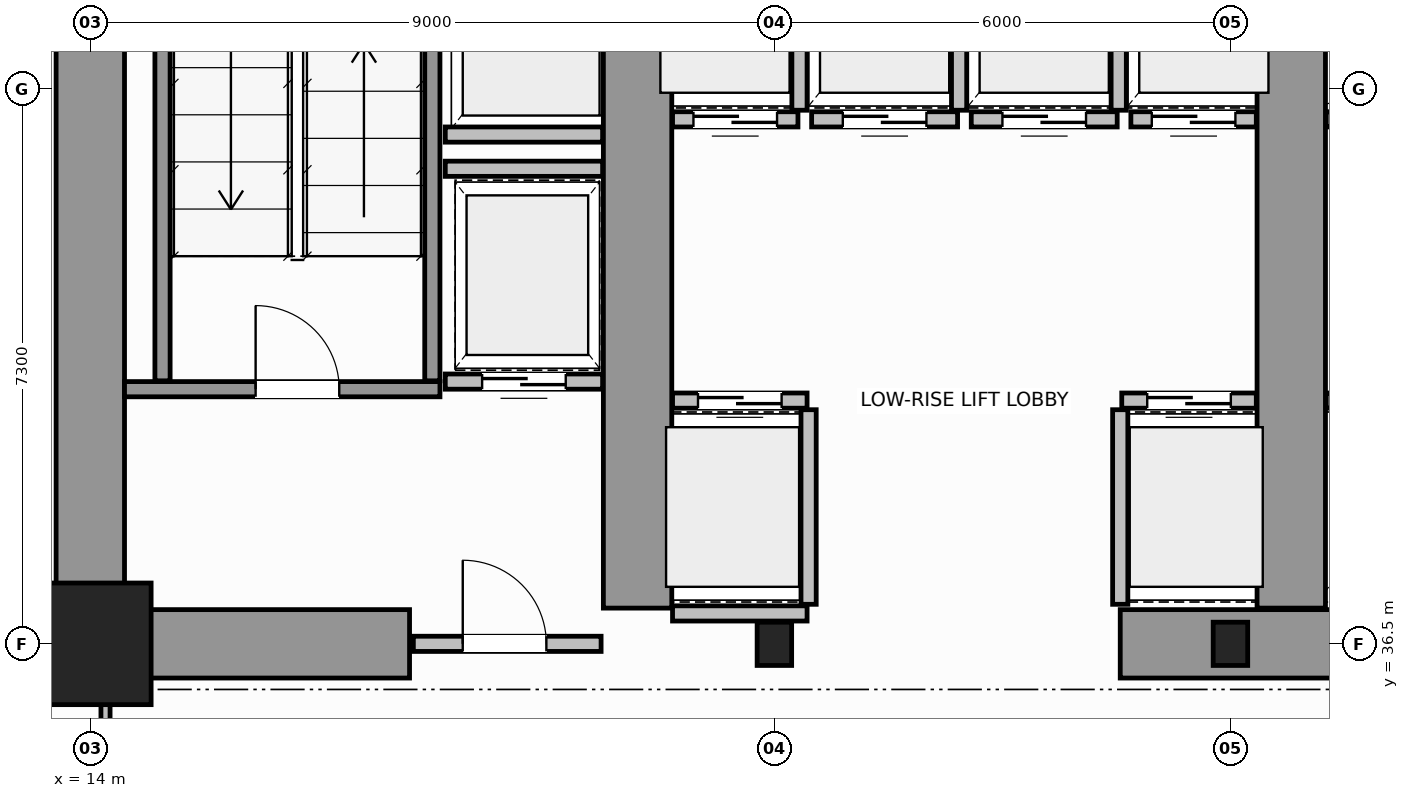
"""IFC4 building model, lengths in metres.
Left out: names, types, materials, properties, quantities, classifications, styles, units other than length and angle.
Written with IfcOpenShell. Run it as: python <this file> out.ifc"""

import sys

from ifc_helpers import new_model, si_unit, direction, frame, frame_2d, origin, origin_2d, place, context, subcontext, project, spatial, rectangle, i_section, extrude, source, transform, mapped, element, fill, save


model = new_model("IFC4")
c1 = context("Model", 3, precision=1e-05, world=origin(), true_north=direction((0.0, 1.0)))
c2 = subcontext(c1, "Body", "Model", "MODEL_VIEW")
j1 = project(units=[si_unit("LENGTHUNIT", "METRE"), si_unit("PLANEANGLEUNIT", "RADIAN")], contexts=[c1])
p1 = place(None, origin())
s1 = spatial("IfcSite", under=j1, at=p1, CompositionType="ELEMENT")
p2 = place(p1, origin())
s2 = spatial("IfcBuilding", under=s1, at=p2, CompositionType="ELEMENT")
p3 = place(p2, frame((0.0, 0.0, 37.8)))
s3 = spatial("IfcBuildingStorey", under=s2, at=p3, CompositionType="ELEMENT", Elevation=37.8)
m1 = source(origin(), c2, "Body", "SweptSolid", [
    extrude(rectangle(XDim=1.6, YDim=1.6, at=origin_2d()), origin(), (0.0, 0.0, 1.0), 3.8),
])
p4 = place(p3, frame((14.0, 36.5, 0.0), z_axis=(0.0, 0.0, 1.0), x_axis=(1.0, 0.0, 0.0)))
e1 = element("IfcColumn", 1, at=p4, inside=s3, PredefinedType="COLUMN", context=c2, shape_type="MappedRepresentation", body=[
    mapped(m1, transform((0.0, 0.0, 0.0), scale=1.0)),
])
m2 = source(origin(), c2, "Body", "SweptSolid", [
    extrude(i_section(OverallWidth=0.454, OverallDepth=0.569, WebThickness=0.078, FlangeThickness=0.08, FilletRadius=0.015, at=origin_2d()), origin(), (0.0, 0.0, 1.0), 3.8),
])
for number, where, z_axis, x_axis in (
    (2, (23.0, 36.5, 0.0), (0.0, 0.0, 1.0), (1.0, 0.0, 0.0)),
    (3, (29.0, 36.5, 0.0), (0.0, 0.0, 1.0), (1.0, 0.0, 0.0)),
):
    element("IfcColumn", number, at=place(p3, frame(where, z_axis=z_axis, x_axis=x_axis)), inside=s3, PredefinedType="COLUMN", context=c2, shape_type="MappedRepresentation", body=[
        mapped(m2, transform((0.0, 0.0, 0.0), scale=1.0)),
    ])
p5 = place(p3, frame((14.0, 36.5, 0.0), z_axis=(0.0, 0.0, 1.0), x_axis=(0.0, 1.0, 0.0)))
e4 = element("IfcWall", 4, at=p5, inside=s3, PredefinedType="SHEAR", context=c2, shape_type="SweptSolid", body=[
    extrude(rectangle(XDim=14.5, YDim=0.9, at=frame_2d((7.25, 0.0))), origin(), (0.0, 0.0, 1.0), 3.8),
])
p6 = place(p3, frame((14.47, 36.5, 0.0), z_axis=(0.0, 0.0, 1.0), x_axis=(1.0, 0.0, 0.0)))
e5 = element("IfcWall", 5, at=p6, inside=s3, PredefinedType="SHEAR", context=c2, shape_type="SweptSolid", body=[
    extrude(rectangle(XDim=3.73, YDim=0.9, at=frame_2d((1.865, 0.0))), origin(), (0.0, 0.0, 1.0), 2.38),
])
p7 = place(p3, frame((27.55, 36.5, 0.0), z_axis=(0.0, 0.0, 1.0), x_axis=(1.0, 0.0, 0.0)))
e6 = element("IfcWall", 6, at=p7, inside=s3, PredefinedType="SHEAR", context=c2, shape_type="SweptSolid", body=[
    extrude(rectangle(XDim=4.5, YDim=0.9, at=frame_2d((2.25, 0.0))), origin(), (0.0, 0.0, 1.0), 3.8),
])
for number, where, z_axis, x_axis in (
    (7, (21.2, 36.97, 0.0), (0.0, 0.0, 1.0), (0.0, 1.0, 0.0)),
    (8, (29.8, 36.97, 0.0), (0.0, 0.0, 1.0), (0.0, 1.0, 0.0)),
):
    element("IfcWall", number, at=place(p3, frame(where, z_axis=z_axis, x_axis=x_axis)), inside=s3, PredefinedType="SHEAR", context=c2, shape_type="SweptSolid", body=[
        extrude(rectangle(XDim=9.23, YDim=0.9, at=frame_2d((4.615, 0.0))), origin(), (0.0, 0.0, 1.0), 3.8),
    ])
p8 = place(p3, frame((14.45, 39.85, 0.0), z_axis=(0.0, 0.0, 1.0), x_axis=(1.0, 0.0, 0.0)))
e9 = element("IfcWall", 9, at=p8, inside=s3, PredefinedType="SOLIDWALL", context=c2, shape_type="SweptSolid", body=[
    extrude(rectangle(XDim=4.15, YDim=0.2, at=frame_2d((2.075, 0.0))), origin(), (0.0, 0.0, 1.0), 3.8),
])
p9 = place(p8, frame((1.725, 0.0, 0.0)))
e10 = element("IfcOpeningElement", 10, at=p9, cuts=e9, PredefinedType="OPENING", context=c2, shape_type="SweptSolid", body=[
    extrude(rectangle(XDim=1.1, YDim=2.15, at=frame_2d((0.55, 1.075))), frame((0.0, 0.11, 0.0), z_axis=(0.0, -1.0, 0.0), x_axis=(1.0, 0.0, 0.0)), (0.0, 0.0, 1.0), 0.22),
])
for number, where, z_axis, x_axis in (
    (11, (14.95, 39.96, 0.0), (0.0, 0.0, 1.0), (0.0, 1.0, 0.0)),
    (12, (18.5, 39.96, 0.0), (0.0, 0.0, 1.0), (0.0, 1.0, 0.0)),
):
    element("IfcWall", number, at=place(p3, frame(where, z_axis=z_axis, x_axis=x_axis)), inside=s3, PredefinedType="SOLIDWALL", context=c2, shape_type="SweptSolid", body=[
        extrude(rectangle(XDim=9.93, YDim=0.2, at=frame_2d((4.965, 0.0))), origin(), (0.0, 0.0, 1.0), 3.8),
    ])
p10 = place(p3, frame((18.25, 36.5, 0.0), z_axis=(0.0, 0.0, 1.0), x_axis=(1.0, 0.0, 0.0)))
e13 = element("IfcWall", 13, at=p10, inside=s3, PredefinedType="SOLIDWALL", context=c2, shape_type="SweptSolid", body=[
    extrude(rectangle(XDim=2.47, YDim=0.2, at=frame_2d((1.235, 0.0))), origin(), (0.0, 0.0, 1.0), 2.37),
])
p11 = place(p10, frame((0.65, 0.0, 0.0)))
e14 = element("IfcOpeningElement", 14, at=p11, cuts=e13, PredefinedType="OPENING", context=c2, shape_type="SweptSolid", body=[
    extrude(rectangle(XDim=1.1, YDim=2.15, at=frame_2d((0.55, 1.075))), frame((0.0, 0.11, 0.0), z_axis=(0.0, -1.0, 0.0), x_axis=(1.0, 0.0, 0.0)), (0.0, 0.0, 1.0), 0.22),
])
p12 = place(p3, frame((21.66, 39.7, 0.0), z_axis=(0.0, 0.0, 1.0), x_axis=(1.0, 0.0, 0.0)))
e15 = element("IfcWall", 15, at=p12, inside=s3, PredefinedType="SOLIDWALL", context=c2, shape_type="SweptSolid", body=[
    extrude(rectangle(XDim=1.77, YDim=0.2, at=frame_2d((0.885, 0.0))), origin(), (0.0, 0.0, 1.0), 3.58),
])
p13 = place(p12, frame((0.335, 0.0, 0.0)))
e16 = element("IfcOpeningElement", 16, at=p13, cuts=e15, PredefinedType="OPENING", context=c2, shape_type="SweptSolid", body=[
    extrude(rectangle(XDim=1.1, YDim=2.15, at=frame_2d((0.55, 1.075))), frame((0.0, 0.11, 0.0), z_axis=(0.0, -1.0, 0.0), x_axis=(1.0, 0.0, 0.0)), (0.0, 0.0, 1.0), 0.22),
])
p14 = place(p3, frame((21.66, 36.9, 0.0), z_axis=(0.0, 0.0, 1.0), x_axis=(1.0, 0.0, 0.0)))
e17 = element("IfcWall", 17, at=p14, inside=s3, PredefinedType="SOLIDWALL", context=c2, shape_type="SweptSolid", body=[
    extrude(rectangle(XDim=1.77, YDim=0.2, at=frame_2d((0.885, 0.0))), origin(), (0.0, 0.0, 1.0), 2.37),
])
p15 = place(p3, frame((23.45, 37.02, 0.0), z_axis=(0.0, 0.0, 1.0), x_axis=(0.0, 1.0, 0.0)))
e18 = element("IfcWall", 18, at=p15, inside=s3, PredefinedType="SOLIDWALL", context=c2, shape_type="SweptSolid", body=[
    extrude(rectangle(XDim=2.56, YDim=0.2, at=frame_2d((1.28, 0.0))), origin(), (0.0, 0.0, 1.0), 3.58),
])
p16 = place(p3, frame((27.57, 39.7, 0.0), z_axis=(0.0, 0.0, 1.0), x_axis=(1.0, 0.0, 0.0)))
e19 = element("IfcWall", 19, at=p16, inside=s3, PredefinedType="SOLIDWALL", context=c2, shape_type="SweptSolid", body=[
    extrude(rectangle(XDim=1.77, YDim=0.2, at=frame_2d((0.885, 0.0))), origin(), (0.0, 0.0, 1.0), 3.58),
])
p17 = place(p16, frame((0.335, 0.0, 0.0)))
e20 = element("IfcOpeningElement", 20, at=p17, cuts=e19, PredefinedType="OPENING", context=c2, shape_type="SweptSolid", body=[
    extrude(rectangle(XDim=1.1, YDim=2.15, at=frame_2d((0.55, 1.075))), frame((0.0, 0.11, 0.0), z_axis=(0.0, -1.0, 0.0), x_axis=(1.0, 0.0, 0.0)), (0.0, 0.0, 1.0), 0.22),
])
p18 = place(p3, frame((27.55, 37.02, 0.0), z_axis=(0.0, 0.0, 1.0), x_axis=(0.0, 1.0, 0.0)))
e21 = element("IfcWall", 21, at=p18, inside=s3, PredefinedType="SOLIDWALL", context=c2, shape_type="SweptSolid", body=[
    extrude(rectangle(XDim=2.56, YDim=0.2, at=frame_2d((1.28, 0.0))), origin(), (0.0, 0.0, 1.0), 3.58),
])
p19 = place(p3, frame((21.66, 43.4, 0.0), z_axis=(0.0, 0.0, 1.0), x_axis=(1.0, 0.0, 0.0)))
e22 = element("IfcWall", 22, at=p19, inside=s3, PredefinedType="SOLIDWALL", context=c2, shape_type="SweptSolid", body=[
    extrude(rectangle(XDim=1.65, YDim=0.2, at=frame_2d((0.825, 0.0))), origin(), (0.0, 0.0, 1.0), 3.58),
])
p20 = place(p19, frame((0.275, 0.0, 0.0)))
e23 = element("IfcOpeningElement", 23, at=p20, cuts=e22, PredefinedType="OPENING", context=c2, shape_type="SweptSolid", body=[
    extrude(rectangle(XDim=1.1, YDim=2.15, at=frame_2d((0.55, 1.075))), frame((0.0, 0.11, 0.0), z_axis=(0.0, -1.0, 0.0), x_axis=(1.0, 0.0, 0.0)), (0.0, 0.0, 1.0), 0.22),
])
p21 = place(p3, frame((23.33, 43.52, 0.0), z_axis=(0.0, 0.0, 1.0), x_axis=(0.0, 1.0, 0.0)))
e24 = element("IfcWall", 24, at=p21, inside=s3, PredefinedType="SOLIDWALL", context=c2, shape_type="SweptSolid", body=[
    extrude(rectangle(XDim=2.56, YDim=0.2, at=frame_2d((1.28, 0.0))), origin(), (0.0, 0.0, 1.0), 3.58),
])
p22 = place(p3, frame((23.49, 43.4, 0.0), z_axis=(0.0, 0.0, 1.0), x_axis=(1.0, 0.0, 0.0)))
e25 = element("IfcWall", 25, at=p22, inside=s3, PredefinedType="SOLIDWALL", context=c2, shape_type="SweptSolid", body=[
    extrude(rectangle(XDim=1.92, YDim=0.2, at=frame_2d((0.96, 0.0))), origin(), (0.0, 0.0, 1.0), 3.58),
])
p23 = place(p22, frame((0.41, 0.0, 0.0)))
e26 = element("IfcOpeningElement", 26, at=p23, cuts=e25, PredefinedType="OPENING", context=c2, shape_type="SweptSolid", body=[
    extrude(rectangle(XDim=1.1, YDim=2.15, at=frame_2d((0.55, 1.075))), frame((0.0, 0.11, 0.0), z_axis=(0.0, -1.0, 0.0), x_axis=(1.0, 0.0, 0.0)), (0.0, 0.0, 1.0), 0.22),
])
p24 = place(p3, frame((25.43, 43.52, 0.0), z_axis=(0.0, 0.0, 1.0), x_axis=(0.0, 1.0, 0.0)))
e27 = element("IfcWall", 27, at=p24, inside=s3, PredefinedType="SOLIDWALL", context=c2, shape_type="SweptSolid", body=[
    extrude(rectangle(XDim=2.56, YDim=0.2, at=frame_2d((1.28, 0.0))), origin(), (0.0, 0.0, 1.0), 3.58),
])
p25 = place(p3, frame((25.59, 43.4, 0.0), z_axis=(0.0, 0.0, 1.0), x_axis=(1.0, 0.0, 0.0)))
e28 = element("IfcWall", 28, at=p25, inside=s3, PredefinedType="SOLIDWALL", context=c2, shape_type="SweptSolid", body=[
    extrude(rectangle(XDim=1.92, YDim=0.2, at=frame_2d((0.96, 0.0))), origin(), (0.0, 0.0, 1.0), 3.58),
])
p26 = place(p25, frame((0.41, 0.0, 0.0)))
e29 = element("IfcOpeningElement", 29, at=p26, cuts=e28, PredefinedType="OPENING", context=c2, shape_type="SweptSolid", body=[
    extrude(rectangle(XDim=1.1, YDim=2.15, at=frame_2d((0.55, 1.075))), frame((0.0, 0.11, 0.0), z_axis=(0.0, -1.0, 0.0), x_axis=(1.0, 0.0, 0.0)), (0.0, 0.0, 1.0), 0.22),
])
p27 = place(p3, frame((27.53, 43.52, 0.0), z_axis=(0.0, 0.0, 1.0), x_axis=(0.0, 1.0, 0.0)))
e30 = element("IfcWall", 30, at=p27, inside=s3, PredefinedType="SOLIDWALL", context=c2, shape_type="SweptSolid", body=[
    extrude(rectangle(XDim=2.56, YDim=0.2, at=frame_2d((1.28, 0.0))), origin(), (0.0, 0.0, 1.0), 3.58),
])
p28 = place(p3, frame((27.69, 43.4, 0.0), z_axis=(0.0, 0.0, 1.0), x_axis=(1.0, 0.0, 0.0)))
e31 = element("IfcWall", 31, at=p28, inside=s3, PredefinedType="SOLIDWALL", context=c2, shape_type="SweptSolid", body=[
    extrude(rectangle(XDim=1.65, YDim=0.2, at=frame_2d((0.825, 0.0))), origin(), (0.0, 0.0, 1.0), 3.58),
])
p29 = place(p28, frame((0.275, 0.0, 0.0)))
e32 = element("IfcOpeningElement", 32, at=p29, cuts=e31, PredefinedType="OPENING", context=c2, shape_type="SweptSolid", body=[
    extrude(rectangle(XDim=1.1, YDim=2.15, at=frame_2d((0.55, 1.075))), frame((0.0, 0.11, 0.0), z_axis=(0.0, -1.0, 0.0), x_axis=(1.0, 0.0, 0.0)), (0.0, 0.0, 1.0), 0.22),
])
p30 = place(p3, frame((30.26, 39.7, 0.0), z_axis=(0.0, 0.0, 1.0), x_axis=(1.0, 0.0, 0.0)))
e33 = element("IfcWall", 33, at=p30, inside=s3, PredefinedType="SOLIDWALL", context=c2, shape_type="SweptSolid", body=[
    extrude(rectangle(XDim=1.77, YDim=0.2, at=frame_2d((0.885, 0.0))), origin(), (0.0, 0.0, 1.0), 3.58),
])
p31 = place(p3, frame((30.26, 43.4, 0.0), z_axis=(0.0, 0.0, 1.0), x_axis=(1.0, 0.0, 0.0)))
e34 = element("IfcWall", 34, at=p31, inside=s3, PredefinedType="SOLIDWALL", context=c2, shape_type="SweptSolid", body=[
    extrude(rectangle(XDim=1.65, YDim=0.2, at=frame_2d((0.825, 0.0))), origin(), (0.0, 0.0, 1.0), 3.58),
])
p32 = place(p3, frame((18.67, 43.2, 0.0), z_axis=(0.0, 0.0, 1.0), x_axis=(1.0, 0.0, 0.0)))
e35 = element("IfcWall", 35, at=p32, inside=s3, PredefinedType="SOLIDWALL", context=c2, shape_type="SweptSolid", body=[
    extrude(rectangle(XDim=2.07, YDim=0.2, at=frame_2d((1.035, 0.0))), origin(), (0.0, 0.0, 1.0), 3.58),
])
p33 = place(p3, frame((18.67, 39.95, 0.0), z_axis=(0.0, 0.0, 1.0), x_axis=(1.0, 0.0, 0.0)))
e36 = element("IfcWall", 36, at=p33, inside=s3, PredefinedType="SOLIDWALL", context=c2, shape_type="SweptSolid", body=[
    extrude(rectangle(XDim=2.07, YDim=0.2, at=frame_2d((1.035, 0.0))), origin(), (0.0, 0.0, 1.0), 3.58),
])
p34 = place(p33, frame((0.485, 0.0, 0.0)))
e37 = element("IfcOpeningElement", 37, at=p34, cuts=e36, PredefinedType="OPENING", context=c2, shape_type="SweptSolid", body=[
    extrude(rectangle(XDim=1.1, YDim=2.15, at=frame_2d((0.55, 1.075))), frame((0.0, 0.11, 0.0), z_axis=(0.0, -1.0, 0.0), x_axis=(1.0, 0.0, 0.0)), (0.0, 0.0, 1.0), 0.22),
])
p35 = place(p3, frame((18.67, 42.75, 0.0), z_axis=(0.0, 0.0, 1.0), x_axis=(1.0, 0.0, 0.0)))
e38 = element("IfcWall", 38, at=p35, inside=s3, PredefinedType="SOLIDWALL", context=c2, shape_type="SweptSolid", body=[
    extrude(rectangle(XDim=2.07, YDim=0.2, at=frame_2d((1.035, 0.0))), origin(), (0.0, 0.0, 1.0), 3.58),
])
p36 = place(p3, frame((14.2, 34.0, 0.0), z_axis=(0.0, 0.0, 1.0), x_axis=(0.0, 1.0, 0.0)))
e39 = element("IfcWall", 39, at=p36, inside=s3, PredefinedType="PARTITIONING", context=c2, shape_type="SweptSolid", body=[
    extrude(rectangle(XDim=2.44, YDim=0.12, at=frame_2d((1.22, 0.0))), origin(), (0.0, 0.0, 1.0), 3.58),
])
p37 = place(p36, frame((0.35, 0.0, 0.0)))
e40 = element("IfcOpeningElement", 40, at=p37, cuts=e39, PredefinedType="OPENING", context=c2, shape_type="SweptSolid", body=[
    extrude(rectangle(XDim=0.9, YDim=2.15, at=frame_2d((0.45, 1.075))), frame((0.0, 0.07, 0.0), z_axis=(0.0, -1.0, 0.0), x_axis=(1.0, 0.0, 0.0)), (0.0, 0.0, 1.0), 0.14),
])
m3 = source(origin(), c2, "Body", "SweptSolid", [
    extrude(rectangle(XDim=1.1, YDim=2.15, at=frame_2d((0.55, 1.075))), frame((0.0, 0.025, 0.0), z_axis=(0.0, -1.0, 0.0), x_axis=(1.0, 0.0, 0.0)), (0.0, 0.0, 1.0), 0.05),
])
p38 = place(p9, origin())
e41 = element("IfcDoor", 41, at=p38, inside=s3, OperationType="SINGLE_SWING_LEFT", PredefinedType="DOOR", context=c2, shape_type="MappedRepresentation", body=[
    mapped(m3, transform((0.0, 0.0, 0.0), scale=1.0)),
])
fill(e10, e41)
p39 = place(p11, origin())
e42 = element("IfcDoor", 42, at=p39, inside=s3, OperationType="SINGLE_SWING_RIGHT", PredefinedType="DOOR", context=c2, shape_type="MappedRepresentation", body=[
    mapped(m3, transform((0.0, 0.0, 0.0), scale=1.0)),
])
fill(e14, e42)
p40 = place(p13, origin())
e43 = element("IfcDoor", 43, at=p40, inside=s3, OperationType="DOUBLE_DOOR_SLIDING", PredefinedType="DOOR", context=c2, shape_type="MappedRepresentation", body=[
    mapped(m3, transform((0.0, 0.0, 0.0), scale=1.0)),
])
fill(e16, e43)
p41 = place(p17, origin())
e44 = element("IfcDoor", 44, at=p41, inside=s3, OperationType="DOUBLE_DOOR_SLIDING", PredefinedType="DOOR", context=c2, shape_type="MappedRepresentation", body=[
    mapped(m3, transform((0.0, 0.0, 0.0), scale=1.0)),
])
fill(e20, e44)
p42 = place(p20, origin())
e45 = element("IfcDoor", 45, at=p42, inside=s3, OperationType="DOUBLE_DOOR_SLIDING", PredefinedType="DOOR", context=c2, shape_type="MappedRepresentation", body=[
    mapped(m3, transform((0.0, 0.0, 0.0), scale=1.0)),
])
fill(e23, e45)
p43 = place(p23, origin())
e46 = element("IfcDoor", 46, at=p43, inside=s3, OperationType="DOUBLE_DOOR_SLIDING", PredefinedType="DOOR", context=c2, shape_type="MappedRepresentation", body=[
    mapped(m3, transform((0.0, 0.0, 0.0), scale=1.0)),
])
fill(e26, e46)
p44 = place(p26, origin())
e47 = element("IfcDoor", 47, at=p44, inside=s3, OperationType="DOUBLE_DOOR_SLIDING", PredefinedType="DOOR", context=c2, shape_type="MappedRepresentation", body=[
    mapped(m3, transform((0.0, 0.0, 0.0), scale=1.0)),
])
fill(e29, e47)
p45 = place(p29, origin())
e48 = element("IfcDoor", 48, at=p45, inside=s3, OperationType="DOUBLE_DOOR_SLIDING", PredefinedType="DOOR", context=c2, shape_type="MappedRepresentation", body=[
    mapped(m3, transform((0.0, 0.0, 0.0), scale=1.0)),
])
fill(e32, e48)
p46 = place(p34, origin())
e49 = element("IfcDoor", 49, at=p46, inside=s3, OperationType="DOUBLE_DOOR_SLIDING", PredefinedType="DOOR", context=c2, shape_type="MappedRepresentation", body=[
    mapped(m3, transform((0.0, 0.0, 0.0), scale=1.0)),
])
fill(e37, e49)
save(model, sys.argv[1])
